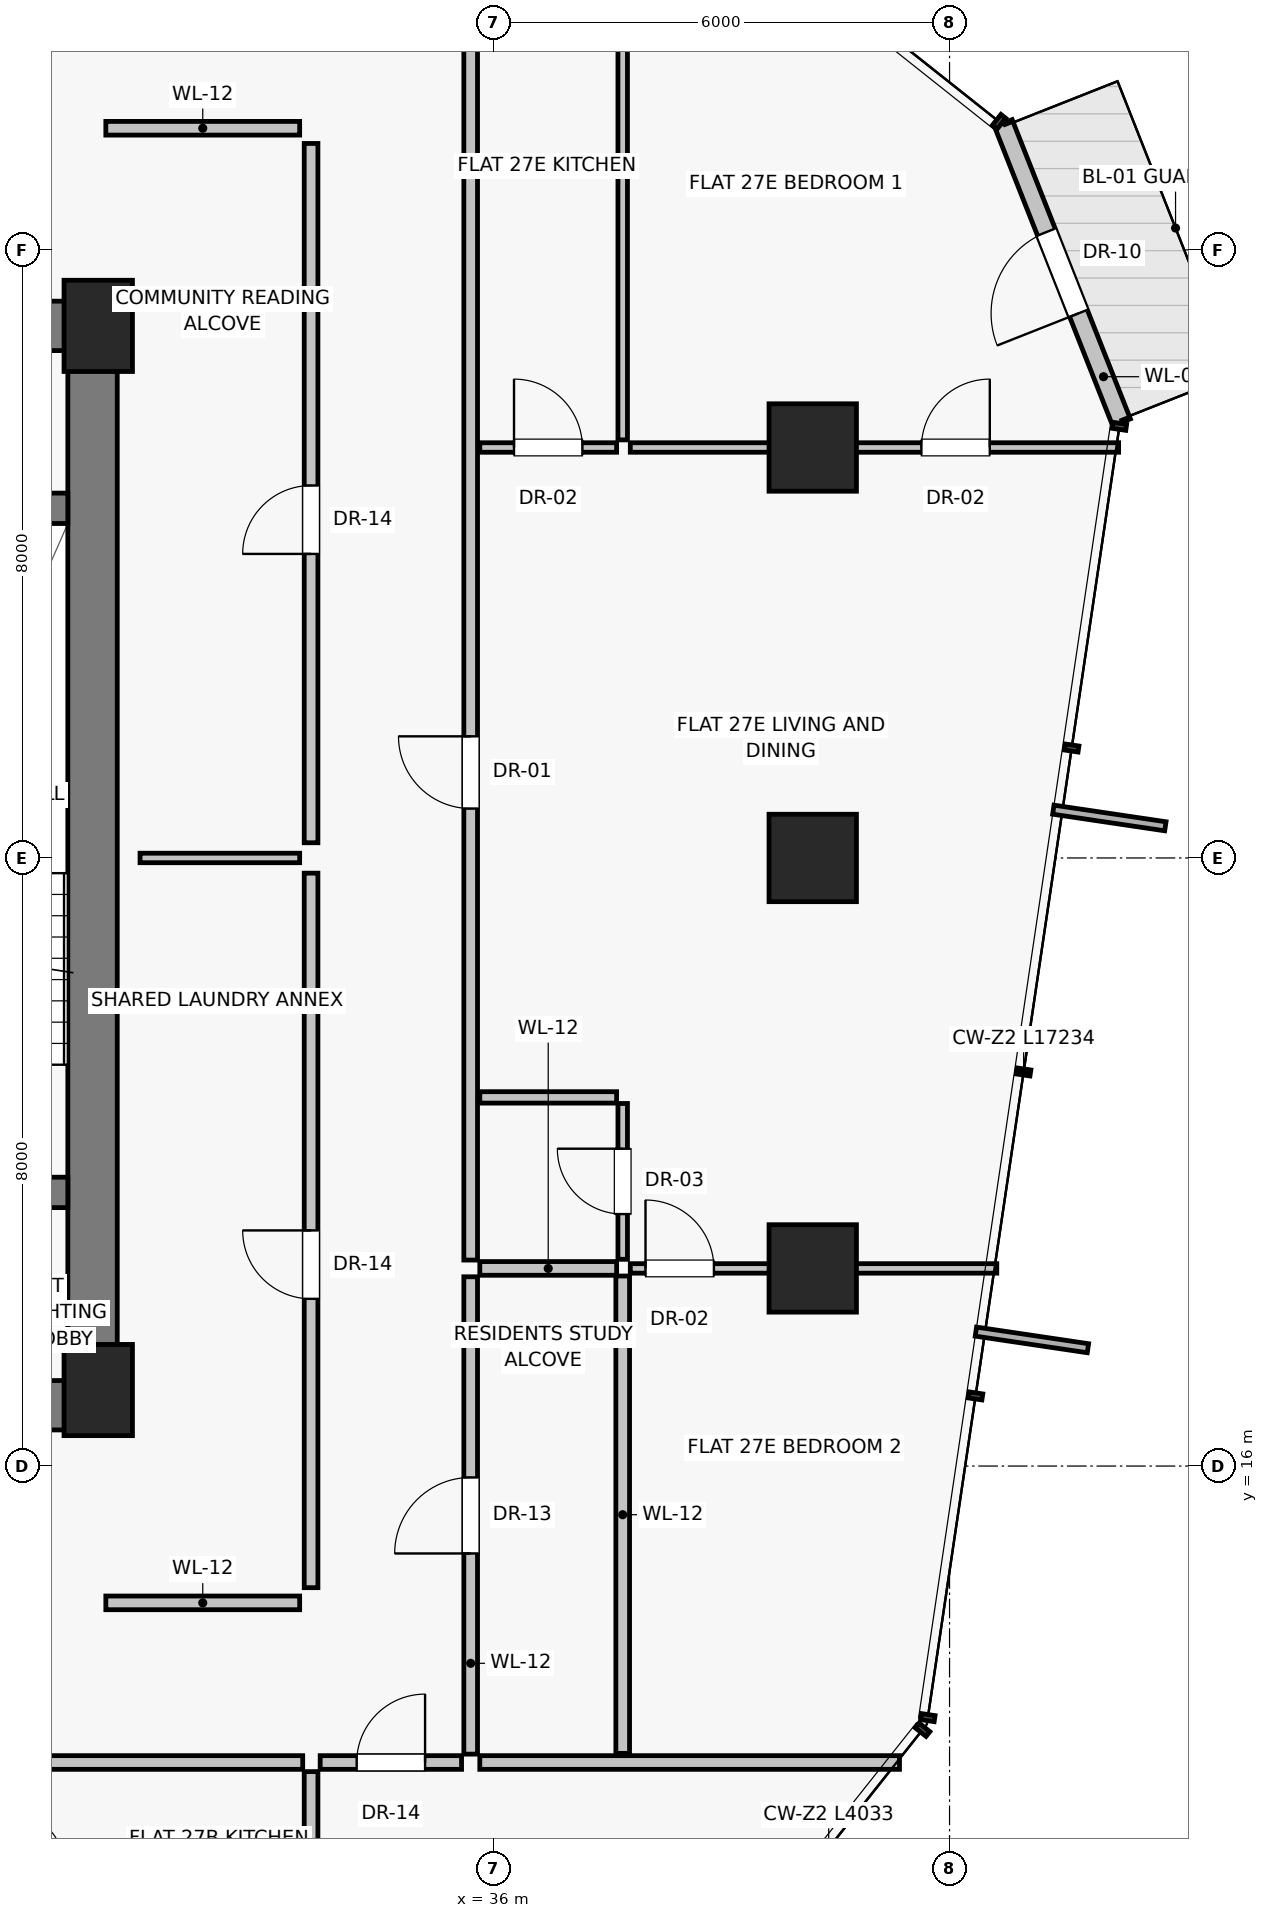
"""IFC4 building model, lengths in metres.
Left out: names, types, materials, properties, quantities, classifications, styles, units other than length and angle.
Written with IfcOpenShell. Run it as: python <this file> out.ifc"""

import sys

from ifc_helpers import new_model, si_unit, direction, frame, frame_2d, origin, origin_2d, place, context, subcontext, project, spatial, rectangle, extrude, source, transform, mapped, element, fill, save


model = new_model("IFC4")
c1 = context("Model", 3, precision=1e-05, world=origin(), true_north=direction((0.0, 1.0)))
c2 = subcontext(c1, "Body", "Model", "MODEL_VIEW")
j1 = project(units=[si_unit("LENGTHUNIT", "METRE"), si_unit("PLANEANGLEUNIT", "RADIAN")], contexts=[c1])
p1 = place(None, origin())
s1 = spatial("IfcSite", under=j1, at=p1, CompositionType="ELEMENT")
p2 = place(p1, origin())
s2 = spatial("IfcBuilding", under=s1, at=p2, CompositionType="ELEMENT")
p3 = place(p2, frame((0.0, 0.0, 99.2)))
s3 = spatial("IfcBuildingStorey", under=s2, at=p3, CompositionType="ELEMENT", Elevation=99.2)
for number, where, z_axis, x_axis in (
    (1, (30.8, 17.0, 0.0), (0.0, 0.0, 1.0), (1.0, 0.0, 0.0)),
    (2, (30.8, 31.0, 0.0), (0.0, 0.0, 1.0), (1.0, 0.0, 0.0)),
):
    element("IfcColumn", number, at=place(p3, frame(where, z_axis=z_axis, x_axis=x_axis)), inside=s3, PredefinedType="PILASTER", context=c2, shape_type="SweptSolid", body=[
        extrude(rectangle(XDim=0.9, YDim=1.2, at=origin_2d()), origin(), (0.0, 0.0, 1.0), 3.25),
    ])
for number, where, z_axis, x_axis in (
    (3, (40.2, 18.6, 0.0), (0.0, 0.0, 1.0), (1.0, 0.0, 0.0)),
    (4, (40.2, 24.0, 0.0), (0.0, 0.0, 1.0), (1.0, 0.0, 0.0)),
    (5, (40.2, 29.4, 0.0), (0.0, 0.0, 1.0), (1.0, 0.0, 0.0)),
):
    element("IfcColumn", number, at=place(p3, frame(where, z_axis=z_axis, x_axis=x_axis)), inside=s3, PredefinedType="COLUMN", context=c2, shape_type="SweptSolid", body=[
        extrude(rectangle(XDim=1.15, YDim=1.15, at=origin_2d()), origin(), (0.0, 0.0, 1.0), 3.25),
    ])
p4 = place(p3, frame((44.263, 29.73, 0.0), z_axis=(0.0, 0.0, 1.0), x_axis=(-0.367439648657, 0.930047366856, 0.0)))
e6 = element("IfcWall", 6, at=p4, inside=s3, PredefinedType="SOLIDWALL", context=c2, shape_type="SweptSolid", body=[
    extrude(rectangle(XDim=4.233, YDim=0.25, at=frame_2d((2.117, 0.0))), origin(), (0.0, 0.0, 1.0), 3.0),
])
p5 = place(p4, frame((1.542, 0.0, 0.0)))
e7 = element("IfcOpeningElement", 7, at=p5, cuts=e6, PredefinedType="OPENING", context=c2, shape_type="SweptSolid", body=[
    extrude(rectangle(XDim=1.15, YDim=2.25, at=frame_2d((0.575, 1.125))), frame((0.0, 0.135, 0.0), z_axis=(0.0, -1.0, 0.0), x_axis=(1.0, 0.0, 0.0)), (0.0, 0.0, 1.0), 0.27),
])
p6 = place(p3, frame((30.725, 16.8, 0.0), z_axis=(0.0, 0.0, 1.0), x_axis=(0.0, 1.0, 0.0)))
e8 = element("IfcWall", 8, at=p6, inside=s3, PredefinedType="SHEAR", context=c2, shape_type="SweptSolid", body=[
    extrude(rectangle(XDim=14.2, YDim=0.65, at=frame_2d((7.1, 0.0))), origin(), (0.0, 0.0, 1.0), 3.0),
])
p7 = place(p3, frame((24.95, 16.8, 0.0), z_axis=(0.0, 0.0, 1.0), x_axis=(1.0, 0.0, 0.0)))
e9 = element("IfcWall", 9, at=p7, inside=s3, PredefinedType="SHEAR", context=c2, shape_type="SweptSolid", body=[
    extrude(rectangle(XDim=5.85, YDim=0.65, at=frame_2d((2.925, 0.0))), origin(), (0.0, 0.0, 1.0), 3.0),
])
p8 = place(p7, frame((2.15, 0.0, 0.0)))
e10 = element("IfcOpeningElement", 10, at=p8, cuts=e9, PredefinedType="OPENING", context=c2, shape_type="SweptSolid", body=[
    extrude(rectangle(XDim=1.2, YDim=2.03, at=frame_2d((0.6, 1.015))), frame((0.0, 0.335, 0.0), z_axis=(0.0, -1.0, 0.0), x_axis=(1.0, 0.0, 0.0)), (0.0, 0.0, 1.0), 0.67),
])
p9 = place(p3, frame((27.0, 31.0, 0.0), z_axis=(0.0, 0.0, 1.0), x_axis=(1.0, 0.0, 0.0)))
e11 = element("IfcWall", 11, at=p9, inside=s3, PredefinedType="SHEAR", context=c2, shape_type="SweptSolid", body=[
    extrude(rectangle(XDim=3.8, YDim=0.65, at=frame_2d((1.9, 0.0))), origin(), (0.0, 0.0, 1.0), 3.0),
])
p10 = place(p9, frame((0.45, 0.0, 0.0)))
e12 = element("IfcOpeningElement", 12, at=p10, cuts=e11, PredefinedType="OPENING", context=c2, shape_type="SweptSolid", body=[
    extrude(rectangle(XDim=0.86, YDim=2.01, at=frame_2d((0.43, 1.005))), frame((0.0, 0.335, 0.0), z_axis=(0.0, -1.0, 0.0), x_axis=(1.0, 0.0, 0.0)), (0.0, 0.0, 1.0), 0.67),
])
p11 = place(p9, frame((1.9, 0.0, 0.0)))
e13 = element("IfcOpeningElement", 13, at=p11, cuts=e11, PredefinedType="OPENING", context=c2, shape_type="SweptSolid", body=[
    extrude(rectangle(XDim=0.86, YDim=2.01, at=frame_2d((0.43, 1.005))), frame((0.0, 0.335, 0.0), z_axis=(0.0, -1.0, 0.0), x_axis=(1.0, 0.0, 0.0)), (0.0, 0.0, 1.0), 0.67),
])
p12 = place(p3, frame((27.0, 19.6, 0.0), z_axis=(0.0, 0.0, 1.0), x_axis=(1.0, 0.0, 0.0)))
e14 = element("IfcWall", 14, at=p12, inside=s3, PredefinedType="SHEAR", context=c2, shape_type="SweptSolid", body=[
    extrude(rectangle(XDim=3.4, YDim=0.4, at=frame_2d((1.7, 0.0))), origin(), (0.0, 0.0, 1.0), 3.0),
])
p13 = place(p12, frame((1.05, 0.0, 0.0)))
e15 = element("IfcOpeningElement", 15, at=p13, cuts=e14, PredefinedType="OPENING", context=c2, shape_type="SweptSolid", body=[
    extrude(rectangle(XDim=1.1, YDim=2.03, at=frame_2d((0.55, 1.015))), frame((0.0, 0.21, 0.0), z_axis=(0.0, -1.0, 0.0), x_axis=(1.0, 0.0, 0.0)), (0.0, 0.0, 1.0), 0.42),
])
p14 = place(p3, frame((27.0, 28.6, 0.0), z_axis=(0.0, 0.0, 1.0), x_axis=(1.0, 0.0, 0.0)))
e16 = element("IfcWall", 16, at=p14, inside=s3, PredefinedType="SHEAR", context=c2, shape_type="SweptSolid", body=[
    extrude(rectangle(XDim=3.4, YDim=0.4, at=frame_2d((1.7, 0.0))), origin(), (0.0, 0.0, 1.0), 3.0),
])
p15 = place(p3, frame((33.6, 14.4, 0.0), z_axis=(0.0, 0.0, 1.0), x_axis=(0.0, 1.0, 0.0)))
e17 = element("IfcWall", 17, at=p15, inside=s3, PredefinedType="PARTITIONING", context=c2, shape_type="SweptSolid", body=[
    extrude(rectangle(XDim=9.4, YDim=0.18, at=frame_2d((4.7, 0.0))), origin(), (0.0, 0.0, 1.0), 3.0),
])
p16 = place(p15, frame((3.8, 0.0, 0.0)))
e18 = element("IfcOpeningElement", 18, at=p16, cuts=e17, PredefinedType="OPENING", context=c2, shape_type="SweptSolid", body=[
    extrude(rectangle(XDim=0.9, YDim=2.01, at=frame_2d((0.45, 1.005))), frame((0.0, 0.1, 0.0), z_axis=(0.0, -1.0, 0.0), x_axis=(1.0, 0.0, 0.0)), (0.0, 0.0, 1.0), 0.2),
])
p17 = place(p3, frame((33.6, 24.2, 0.0), z_axis=(0.0, 0.0, 1.0), x_axis=(0.0, 1.0, 0.0)))
e19 = element("IfcWall", 19, at=p17, inside=s3, PredefinedType="PARTITIONING", context=c2, shape_type="SweptSolid", body=[
    extrude(rectangle(XDim=9.2, YDim=0.18, at=frame_2d((4.6, 0.0))), origin(), (0.0, 0.0, 1.0), 3.0),
])
p18 = place(p17, frame((3.8, 0.0, 0.0)))
e20 = element("IfcOpeningElement", 20, at=p18, cuts=e19, PredefinedType="OPENING", context=c2, shape_type="SweptSolid", body=[
    extrude(rectangle(XDim=0.9, YDim=2.01, at=frame_2d((0.45, 1.005))), frame((0.0, 0.1, 0.0), z_axis=(0.0, -1.0, 0.0), x_axis=(1.0, 0.0, 0.0)), (0.0, 0.0, 1.0), 0.2),
])
p19 = place(p3, frame((31.35, 24.0, 0.0), z_axis=(0.0, 0.0, 1.0), x_axis=(1.0, 0.0, 0.0)))
e21 = element("IfcWall", 21, at=p19, inside=s3, PredefinedType="PARTITIONING", context=c2, shape_type="SweptSolid", body=[
    extrude(rectangle(XDim=2.1, YDim=0.125, at=frame_2d((1.05, 0.0))), origin(), (0.0, 0.0, 1.0), 3.0),
])
for number, where, z_axis, x_axis in (
    (22, (30.9, 14.2, 0.0), (0.0, 0.0, 1.0), (1.0, 0.0, 0.0)),
    (23, (30.9, 33.6, 0.0), (0.0, 0.0, 1.0), (1.0, 0.0, 0.0)),
):
    element("IfcWall", number, at=place(p3, frame(where, z_axis=z_axis, x_axis=x_axis)), inside=s3, PredefinedType="PARTITIONING", context=c2, shape_type="SweptSolid", body=[
        extrude(rectangle(XDim=2.55, YDim=0.18, at=frame_2d((1.275, 0.0))), origin(), (0.0, 0.0, 1.0), 3.0),
    ])
p20 = place(p3, frame((33.6, 11.98, 0.0), z_axis=(0.0, 0.0, 1.0), x_axis=(0.0, -1.0, 0.0)))
e24 = element("IfcWall", 24, at=p20, inside=s3, PredefinedType="PARTITIONING", context=c2, shape_type="SweptSolid", body=[
    extrude(rectangle(XDim=4.845, YDim=0.18, at=frame_2d((2.422, 0.0))), origin(), (0.0, 0.0, 1.0), 3.0),
])
p21 = place(p3, frame((24.754, 12.1, 0.0), z_axis=(0.0, 0.0, 1.0), x_axis=(1.0, 0.0, 0.0)))
e25 = element("IfcWall", 25, at=p21, inside=s3, PredefinedType="PARTITIONING", context=c2, shape_type="SweptSolid", body=[
    extrude(rectangle(XDim=8.736, YDim=0.18, at=frame_2d((4.368, 0.0))), origin(), (0.0, 0.0, 1.0), 2.58),
])
p22 = place(p21, frame((2.958, 0.0, 0.0)))
e26 = element("IfcOpeningElement", 26, at=p22, cuts=e25, PredefinedType="OPENING", context=c2, shape_type="SweptSolid", body=[
    extrude(rectangle(XDim=0.95, YDim=2.02, at=frame_2d((0.475, 1.01))), frame((0.0, 0.1, 0.0), z_axis=(0.0, -1.0, 0.0), x_axis=(1.0, 0.0, 0.0)), (0.0, 0.0, 1.0), 0.2),
])
p23 = place(p3, frame((35.82, 12.1, 0.0), z_axis=(0.0, 0.0, 1.0), x_axis=(1.0, 0.0, 0.0)))
e27 = element("IfcWall", 27, at=p23, inside=s3, PredefinedType="PARTITIONING", context=c2, shape_type="SweptSolid", body=[
    extrude(rectangle(XDim=5.521, YDim=0.18, at=frame_2d((2.761, 0.0))), origin(), (0.0, 0.0, 1.0), 3.0),
])
p24 = place(p3, frame((35.7, 12.21, 0.0), z_axis=(0.0, 0.0, 1.0), x_axis=(0.0, 1.0, 0.0)))
e28 = element("IfcWall", 28, at=p24, inside=s3, PredefinedType="PARTITIONING", context=c2, shape_type="SweptSolid", body=[
    extrude(rectangle(XDim=6.28, YDim=0.18, at=frame_2d((3.14, 0.0))), origin(), (0.0, 0.0, 1.0), 2.58),
])
p25 = place(p24, frame((2.64, 0.0, 0.0)))
e29 = element("IfcOpeningElement", 29, at=p25, cuts=e28, PredefinedType="OPENING", context=c2, shape_type="SweptSolid", body=[
    extrude(rectangle(XDim=1.0, YDim=2.01, at=frame_2d((0.5, 1.005))), frame((0.0, 0.1, 0.0), z_axis=(0.0, -1.0, 0.0), x_axis=(1.0, 0.0, 0.0)), (0.0, 0.0, 1.0), 0.2),
])
p26 = place(p3, frame((35.7, 18.71, 0.0), z_axis=(0.0, 0.0, 1.0), x_axis=(0.0, 1.0, 0.0)))
e30 = element("IfcWall", 30, at=p26, inside=s3, PredefinedType="PARTITIONING", context=c2, shape_type="SweptSolid", body=[
    extrude(rectangle(XDim=16.88, YDim=0.18, at=frame_2d((8.44, 0.0))), origin(), (0.0, 0.0, 1.0), 2.58),
])
p27 = place(p26, frame((5.94, 0.0, 0.0)))
e31 = element("IfcOpeningElement", 31, at=p27, cuts=e30, PredefinedType="OPENING", context=c2, shape_type="SweptSolid", body=[
    extrude(rectangle(XDim=0.95, YDim=2.02, at=frame_2d((0.475, 1.01))), frame((0.0, 0.1, 0.0), z_axis=(0.0, -1.0, 0.0), x_axis=(1.0, 0.0, 0.0)), (0.0, 0.0, 1.0), 0.2),
])
p28 = place(p3, frame((37.7, 12.22, 0.0), z_axis=(0.0, 0.0, 1.0), x_axis=(0.0, 1.0, 0.0)))
e32 = element("IfcWall", 32, at=p28, inside=s3, PredefinedType="PARTITIONING", context=c2, shape_type="SweptSolid", body=[
    extrude(rectangle(XDim=6.28, YDim=0.18, at=frame_2d((3.14, 0.0))), origin(), (0.0, 0.0, 1.0), 3.0),
])
p29 = place(p3, frame((35.82, 18.6, 0.0), z_axis=(0.0, 0.0, 1.0), x_axis=(1.0, 0.0, 0.0)))
e33 = element("IfcWall", 33, at=p29, inside=s3, PredefinedType="PARTITIONING", context=c2, shape_type="SweptSolid", body=[
    extrude(rectangle(XDim=1.8, YDim=0.18, at=frame_2d((0.9, 0.0))), origin(), (0.0, 0.0, 1.0), 2.378),
])
p30 = place(p3, frame((37.8, 18.6, 0.0), z_axis=(0.0, 0.0, 1.0), x_axis=(1.0, 0.0, 0.0)))
e34 = element("IfcWall", 34, at=p30, inside=s3, PredefinedType="PARTITIONING", context=c2, shape_type="SweptSolid", body=[
    extrude(rectangle(XDim=4.822, YDim=0.125, at=frame_2d((2.411, 0.0))), origin(), (0.0, 0.0, 1.0), 2.378),
])
p31 = place(p30, frame((0.2, 0.0, 0.0)))
e35 = element("IfcOpeningElement", 35, at=p31, cuts=e34, PredefinedType="OPENING", context=c2, shape_type="SweptSolid", body=[
    extrude(rectangle(XDim=0.9, YDim=2.01, at=frame_2d((0.45, 1.005))), frame((0.0, 0.073, 0.0), z_axis=(0.0, -1.0, 0.0), x_axis=(1.0, 0.0, 0.0)), (0.0, 0.0, 1.0), 0.145),
])
p32 = place(p3, frame((35.82, 20.85, 0.0), z_axis=(0.0, 0.0, 1.0), x_axis=(1.0, 0.0, 0.0)))
e36 = element("IfcWall", 36, at=p32, inside=s3, PredefinedType="PARTITIONING", context=c2, shape_type="SweptSolid", body=[
    extrude(rectangle(XDim=1.8, YDim=0.15, at=frame_2d((0.9, 0.0))), origin(), (0.0, 0.0, 1.0), 3.0),
])
p33 = place(p3, frame((37.7, 18.72, 0.0), z_axis=(0.0, 0.0, 1.0), x_axis=(0.0, 1.0, 0.0)))
e37 = element("IfcWall", 37, at=p33, inside=s3, PredefinedType="PARTITIONING", context=c2, shape_type="SweptSolid", body=[
    extrude(rectangle(XDim=2.05, YDim=0.125, at=frame_2d((1.025, 0.0))), origin(), (0.0, 0.0, 1.0), 3.0),
])
p34 = place(p33, frame((0.595, 0.0, 0.0)))
e38 = element("IfcOpeningElement", 38, at=p34, cuts=e37, PredefinedType="OPENING", context=c2, shape_type="SweptSolid", body=[
    extrude(rectangle(XDim=0.86, YDim=2.01, at=frame_2d((0.43, 1.005))), frame((0.0, 0.073, 0.0), z_axis=(0.0, -1.0, 0.0), x_axis=(1.0, 0.0, 0.0)), (0.0, 0.0, 1.0), 0.145),
])
p35 = place(p3, frame((35.82, 29.4, 0.0), z_axis=(0.0, 0.0, 1.0), x_axis=(1.0, 0.0, 0.0)))
e39 = element("IfcWall", 39, at=p35, inside=s3, PredefinedType="PARTITIONING", context=c2, shape_type="SweptSolid", body=[
    extrude(rectangle(XDim=1.8, YDim=0.125, at=frame_2d((0.9, 0.0))), origin(), (0.0, 0.0, 1.0), 2.378),
])
p36 = place(p35, frame((0.45, 0.0, 0.0)))
e40 = element("IfcOpeningElement", 40, at=p36, cuts=e39, PredefinedType="OPENING", context=c2, shape_type="SweptSolid", body=[
    extrude(rectangle(XDim=0.9, YDim=2.01, at=frame_2d((0.45, 1.005))), frame((0.0, 0.073, 0.0), z_axis=(0.0, -1.0, 0.0), x_axis=(1.0, 0.0, 0.0)), (0.0, 0.0, 1.0), 0.145),
])
p37 = place(p3, frame((37.7, 29.5, 0.0), z_axis=(0.0, 0.0, 1.0), x_axis=(0.0, 1.0, 0.0)))
e41 = element("IfcWall", 41, at=p37, inside=s3, PredefinedType="PARTITIONING", context=c2, shape_type="SweptSolid", body=[
    extrude(rectangle(XDim=6.08, YDim=0.125, at=frame_2d((3.04, 0.0))), origin(), (0.0, 0.0, 1.0), 3.0),
])
p38 = place(p3, frame((37.8, 29.4, 0.0), z_axis=(0.0, 0.0, 1.0), x_axis=(1.0, 0.0, 0.0)))
e42 = element("IfcWall", 42, at=p38, inside=s3, PredefinedType="PARTITIONING", context=c2, shape_type="SweptSolid", body=[
    extrude(rectangle(XDim=6.424, YDim=0.125, at=frame_2d((3.212, 0.0))), origin(), (0.0, 0.0, 1.0), 2.378),
])
p39 = place(p38, frame((3.83, 0.0, 0.0)))
e43 = element("IfcOpeningElement", 43, at=p39, cuts=e42, PredefinedType="OPENING", context=c2, shape_type="SweptSolid", body=[
    extrude(rectangle(XDim=0.9, YDim=2.01, at=frame_2d((0.45, 1.005))), frame((0.0, 0.073, 0.0), z_axis=(0.0, -1.0, 0.0), x_axis=(1.0, 0.0, 0.0)), (0.0, 0.0, 1.0), 0.145),
])
p40 = place(p3, frame((33.72, 12.1, 0.0), z_axis=(0.0, 0.0, 1.0), x_axis=(1.0, 0.0, 0.0)))
e44 = element("IfcWall", 44, at=p40, inside=s3, PredefinedType="PARTITIONING", context=c2, shape_type="SweptSolid", body=[
    extrude(rectangle(XDim=1.86, YDim=0.18, at=frame_2d((0.93, 0.0))), origin(), (0.0, 0.0, 1.0), 3.0),
])
p41 = place(p40, frame((0.48, 0.0, 0.0)))
e45 = element("IfcOpeningElement", 45, at=p41, cuts=e44, PredefinedType="OPENING", context=c2, shape_type="SweptSolid", body=[
    extrude(rectangle(XDim=0.9, YDim=2.01, at=frame_2d((0.45, 1.005))), frame((0.0, 0.1, 0.0), z_axis=(0.0, -1.0, 0.0), x_axis=(1.0, 0.0, 0.0)), (0.0, 0.0, 1.0), 0.2),
])
m1 = source(origin(), c2, "Body", "SweptSolid", [
    extrude(rectangle(XDim=1.15, YDim=2.25, at=frame_2d((0.575, 1.125))), frame((0.0, 0.025, 0.0), z_axis=(0.0, -1.0, 0.0), x_axis=(1.0, 0.0, 0.0)), (0.0, 0.0, 1.0), 0.05),
])
p42 = place(p5, frame((1.15, 0.0, 0.0), z_axis=(0.0, 0.0, 1.0), x_axis=(-1.0, 0.0, 0.0)))
e46 = element("IfcDoor", 46, at=p42, inside=s3, OperationType="SINGLE_SWING_LEFT", PredefinedType="DOOR", context=c2, shape_type="MappedRepresentation", body=[
    mapped(m1, transform((0.0, 0.0, 0.0), scale=1.0)),
])
fill(e7, e46)
m2 = source(origin(), c2, "Body", "SweptSolid", [
    extrude(rectangle(XDim=0.9, YDim=2.01, at=frame_2d((0.45, 1.005))), frame((0.0, 0.025, 0.0), z_axis=(0.0, -1.0, 0.0), x_axis=(1.0, 0.0, 0.0)), (0.0, 0.0, 1.0), 0.05),
])
p43 = place(p16, origin())
e47 = element("IfcDoor", 47, at=p43, inside=s3, OperationType="SINGLE_SWING_RIGHT", PredefinedType="DOOR", context=c2, shape_type="MappedRepresentation", body=[
    mapped(m2, transform((0.0, 0.0, 0.0), scale=1.0)),
])
fill(e18, e47)
p44 = place(p18, origin())
e48 = element("IfcDoor", 48, at=p44, inside=s3, OperationType="SINGLE_SWING_LEFT", PredefinedType="DOOR", context=c2, shape_type="MappedRepresentation", body=[
    mapped(m2, transform((0.0, 0.0, 0.0), scale=1.0)),
])
fill(e20, e48)
m3 = source(origin(), c2, "Body", "SweptSolid", [
    extrude(rectangle(XDim=1.0, YDim=2.01, at=frame_2d((0.5, 1.005))), frame((0.0, 0.025, 0.0), z_axis=(0.0, -1.0, 0.0), x_axis=(1.0, 0.0, 0.0)), (0.0, 0.0, 1.0), 0.05),
])
p45 = place(p25, origin())
e49 = element("IfcDoor", 49, at=p45, inside=s3, OperationType="SINGLE_SWING_LEFT", PredefinedType="DOOR", context=c2, shape_type="MappedRepresentation", body=[
    mapped(m3, transform((0.0, 0.0, 0.0), scale=1.0)),
])
fill(e29, e49)
m4 = source(origin(), c2, "Body", "SweptSolid", [
    extrude(rectangle(XDim=0.95, YDim=2.02, at=frame_2d((0.475, 1.01))), frame((0.0, 0.025, 0.0), z_axis=(0.0, -1.0, 0.0), x_axis=(1.0, 0.0, 0.0)), (0.0, 0.0, 1.0), 0.05),
])
p46 = place(p27, origin())
e50 = element("IfcDoor", 50, at=p46, inside=s3, OperationType="SINGLE_SWING_RIGHT", PredefinedType="DOOR", context=c2, shape_type="MappedRepresentation", body=[
    mapped(m4, transform((0.0, 0.0, 0.0), scale=1.0)),
])
fill(e31, e50)
p47 = place(p31, origin())
e51 = element("IfcDoor", 51, at=p47, inside=s3, OperationType="SINGLE_SWING_LEFT", PredefinedType="DOOR", context=c2, shape_type="MappedRepresentation", body=[
    mapped(m2, transform((0.0, 0.0, 0.0), scale=1.0)),
])
fill(e35, e51)
m5 = source(origin(), c2, "Body", "SweptSolid", [
    extrude(rectangle(XDim=0.86, YDim=2.01, at=frame_2d((0.43, 1.005))), frame((0.0, 0.025, 0.0), z_axis=(0.0, -1.0, 0.0), x_axis=(1.0, 0.0, 0.0)), (0.0, 0.0, 1.0), 0.05),
])
p48 = place(p34, origin())
e52 = element("IfcDoor", 52, at=p48, inside=s3, OperationType="SINGLE_SWING_RIGHT", PredefinedType="DOOR", context=c2, shape_type="MappedRepresentation", body=[
    mapped(m5, transform((0.0, 0.0, 0.0), scale=1.0)),
])
fill(e38, e52)
p49 = place(p36, origin())
e53 = element("IfcDoor", 53, at=p49, inside=s3, OperationType="SINGLE_SWING_LEFT", PredefinedType="DOOR", context=c2, shape_type="MappedRepresentation", body=[
    mapped(m2, transform((0.0, 0.0, 0.0), scale=1.0)),
])
fill(e40, e53)
p50 = place(p39, origin())
e54 = element("IfcDoor", 54, at=p50, inside=s3, OperationType="SINGLE_SWING_RIGHT", PredefinedType="DOOR", context=c2, shape_type="MappedRepresentation", body=[
    mapped(m2, transform((0.0, 0.0, 0.0), scale=1.0)),
])
fill(e43, e54)
p51 = place(p41, origin())
e55 = element("IfcDoor", 55, at=p51, inside=s3, OperationType="SINGLE_SWING_RIGHT", PredefinedType="DOOR", context=c2, shape_type="MappedRepresentation", body=[
    mapped(m2, transform((0.0, 0.0, 0.0), scale=1.0)),
])
fill(e45, e55)
save(model, sys.argv[1])
